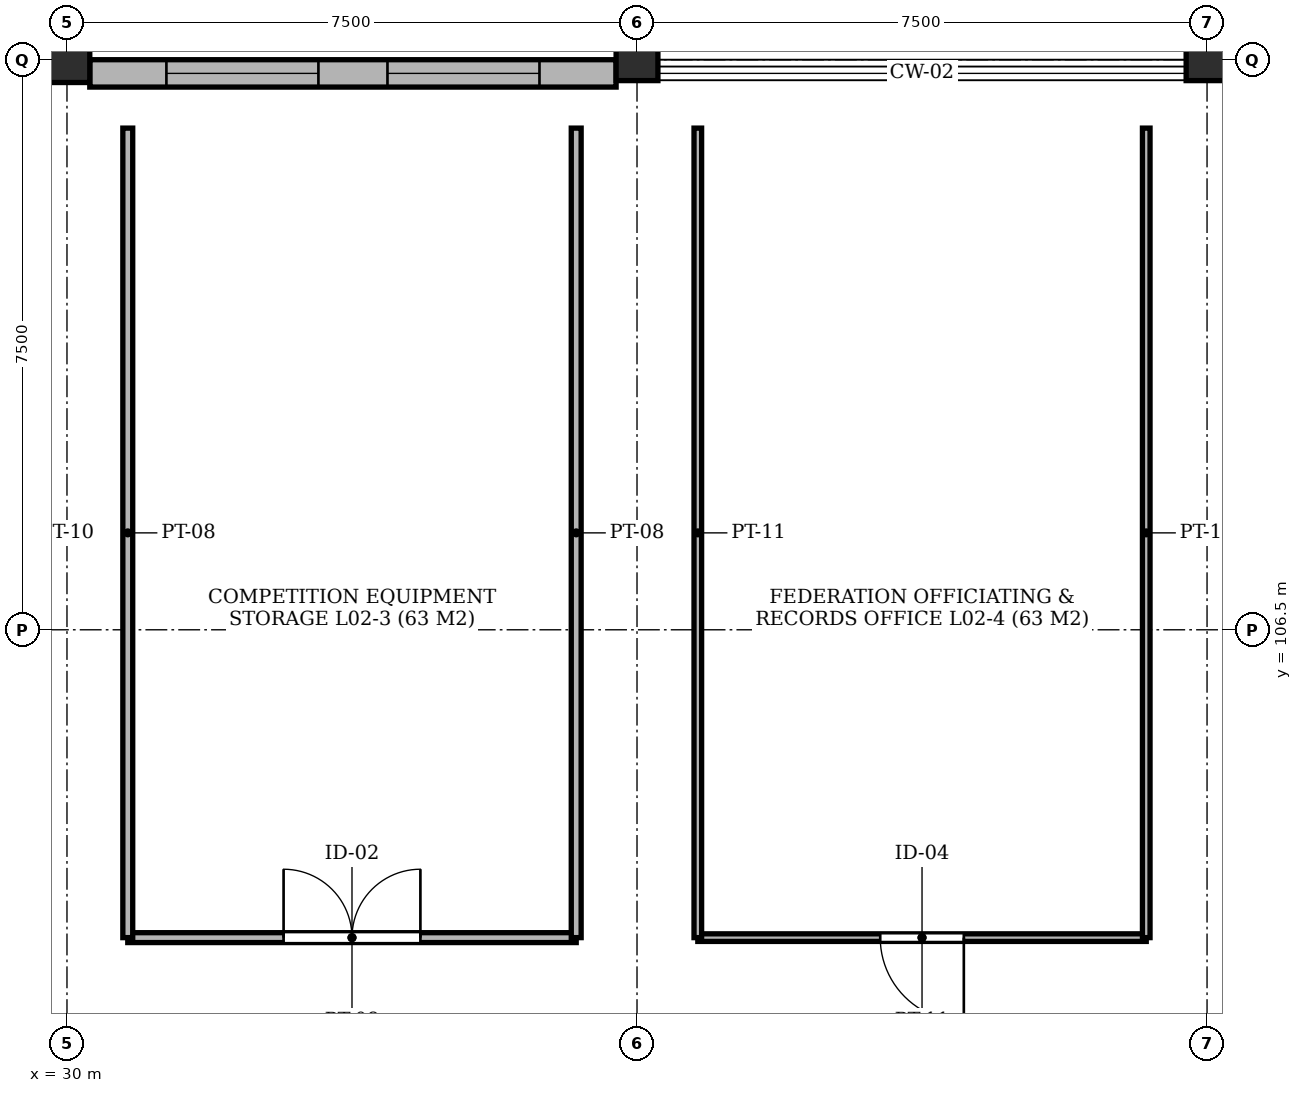
"""IFC4 building model, lengths in metres.
Left out: names, types, materials, properties, quantities, classifications, styles, units other than length and angle.
Written with IfcOpenShell. Run it as: python <this file> out.ifc"""

import sys

from ifc_helpers import new_model, si_unit, direction, frame, frame_2d, origin, origin_2d, place, context, subcontext, project, spatial, rectangle, extrude, element, fill, save


model = new_model("IFC4")
c1 = context("Model", 3, precision=1e-05, world=origin(), true_north=direction((0.0, 1.0)))
c2 = subcontext(c1, "Body", "Model", "MODEL_VIEW")
j1 = project(units=[si_unit("LENGTHUNIT", "METRE"), si_unit("PLANEANGLEUNIT", "RADIAN")], contexts=[c1])
p1 = place(None, origin())
s1 = spatial("IfcSite", under=j1, at=p1, CompositionType="ELEMENT")
p2 = place(p1, origin())
s2 = spatial("IfcBuilding", under=s1, at=p2, CompositionType="ELEMENT")
p3 = place(p2, frame((0.0, 0.0, 9.4)))
s3 = spatial("IfcBuildingStorey", under=s2, at=p3, CompositionType="ELEMENT", Elevation=9.4)
p4 = place(p3, frame((30.0, 114.0, -0.45), z_axis=(0.0, 0.0, 1.0), x_axis=(1.0, 0.0, 0.0)))
e1 = element("IfcColumn", 1, at=p4, inside=s3, PredefinedType="COLUMN", context=c2, shape_type="SweptSolid", body=[
    extrude(rectangle(XDim=0.6, YDim=0.6, at=origin_2d()), origin(), (0.0, 0.0, 1.0), 4.77),
])
for number, where, z_axis, x_axis in (
    (2, (37.5, 114.0, -0.45), (0.0, 0.0, 1.0), (1.0, 0.0, 0.0)),
    (3, (45.0, 114.0, -0.45), (0.0, 0.0, 1.0), (1.0, 0.0, 0.0)),
):
    element("IfcColumn", number, at=place(p3, frame(where, z_axis=z_axis, x_axis=x_axis)), inside=s3, PredefinedType="COLUMN", context=c2, shape_type="SweptSolid", body=[
        extrude(rectangle(XDim=0.55, YDim=0.55, at=origin_2d()), origin(), (0.0, 0.0, 1.0), 4.77),
    ])
p5 = place(p3, frame((37.225, 113.82, 0.0), z_axis=(0.0, 0.0, 1.0), x_axis=(-1.0, 0.0, 0.0)))
e4 = element("IfcWall", 4, at=p5, inside=s3, PredefinedType="SOLIDWALL", context=c2, shape_type="SweptSolid", body=[
    extrude(rectangle(XDim=6.925, YDim=0.36, at=frame_2d((3.462, 0.0))), origin(), (0.0, 0.0, 1.0), 3.82),
])
p6 = place(p5, frame((3.917, 0.0, 0.92)))
e5 = element("IfcOpeningElement", 5, at=p6, cuts=e4, PredefinedType="OPENING", context=c2, shape_type="SweptSolid", body=[
    extrude(rectangle(XDim=2.0, YDim=2.1, at=frame_2d((1.0, 1.05))), frame((0.0, 0.192, 0.0), z_axis=(0.0, -1.0, 0.0), x_axis=(1.0, 0.0, 0.0)), (0.0, 0.0, 1.0), 0.384),
])
p7 = place(p5, frame((1.008, 0.0, 0.92)))
e6 = element("IfcOpeningElement", 6, at=p7, cuts=e4, PredefinedType="OPENING", context=c2, shape_type="SweptSolid", body=[
    extrude(rectangle(XDim=2.0, YDim=2.1, at=frame_2d((1.0, 1.05))), frame((0.0, 0.192, 0.0), z_axis=(0.0, -1.0, 0.0), x_axis=(1.0, 0.0, 0.0)), (0.0, 0.0, 1.0), 0.384),
])
p8 = place(p3, frame((30.8, 102.45, 0.0), z_axis=(0.0, 0.0, 1.0), x_axis=(1.0, 0.0, 0.0)))
e7 = element("IfcWall", 7, at=p8, inside=s3, PredefinedType="PARTITIONING", context=c2, shape_type="SweptSolid", body=[
    extrude(rectangle(XDim=5.9, YDim=0.13, at=frame_2d((2.95, 0.0))), origin(), (0.0, 0.0, 1.0), 3.88),
])
p9 = place(p8, frame((2.05, 0.0, 0.0)))
e8 = element("IfcOpeningElement", 8, at=p9, cuts=e7, PredefinedType="OPENING", context=c2, shape_type="SweptSolid", body=[
    extrude(rectangle(XDim=1.8, YDim=2.25, at=frame_2d((0.9, 1.125))), frame((0.0, 0.077, 0.0), z_axis=(0.0, -1.0, 0.0), x_axis=(1.0, 0.0, 0.0)), (0.0, 0.0, 1.0), 0.154),
])
for number, where, z_axis, x_axis in (
    (9, (30.8, 102.45, 0.0), (0.0, 0.0, 1.0), (0.0, 1.0, 0.0)),
    (10, (36.7, 102.45, 0.0), (0.0, 0.0, 1.0), (0.0, 1.0, 0.0)),
):
    element("IfcWall", number, at=place(p3, frame(where, z_axis=z_axis, x_axis=x_axis)), inside=s3, PredefinedType="PARTITIONING", context=c2, shape_type="SweptSolid", body=[
        extrude(rectangle(XDim=10.65, YDim=0.13, at=frame_2d((5.325, 0.0))), origin(), (0.0, 0.0, 1.0), 3.88),
    ])
p10 = place(p3, frame((38.3, 102.45, 0.0), z_axis=(0.0, 0.0, 1.0), x_axis=(1.0, 0.0, 0.0)))
e11 = element("IfcWall", 11, at=p10, inside=s3, PredefinedType="PARTITIONING", context=c2, shape_type="SweptSolid", body=[
    extrude(rectangle(XDim=5.9, YDim=0.1, at=frame_2d((2.95, 0.0))), origin(), (0.0, 0.0, 1.0), 3.88),
])
p11 = place(p10, frame((2.4, 0.0, 0.0)))
e12 = element("IfcOpeningElement", 12, at=p11, cuts=e11, PredefinedType="OPENING", context=c2, shape_type="SweptSolid", body=[
    extrude(rectangle(XDim=1.1, YDim=2.15, at=frame_2d((0.55, 1.075))), frame((0.0, 0.062, 0.0), z_axis=(0.0, -1.0, 0.0), x_axis=(1.0, 0.0, 0.0)), (0.0, 0.0, 1.0), 0.124),
])
for number, where, z_axis, x_axis in (
    (13, (38.3, 102.45, 0.0), (0.0, 0.0, 1.0), (0.0, 1.0, 0.0)),
    (14, (44.2, 102.45, 0.0), (0.0, 0.0, 1.0), (0.0, 1.0, 0.0)),
):
    element("IfcWall", number, at=place(p3, frame(where, z_axis=z_axis, x_axis=x_axis)), inside=s3, PredefinedType="PARTITIONING", context=c2, shape_type="SweptSolid", body=[
        extrude(rectangle(XDim=10.65, YDim=0.1, at=frame_2d((5.325, 0.0))), origin(), (0.0, 0.0, 1.0), 3.88),
    ])
p12 = place(p6, origin())
e15 = element("IfcWindow", 15, at=p12, inside=s3, PartitioningType="SINGLE_PANEL", PredefinedType="WINDOW", context=c2, shape_type="SweptSolid", body=[
    extrude(rectangle(XDim=2.0, YDim=2.1, at=frame_2d((1.0, 1.05))), frame((0.0, 0.03, 0.0), z_axis=(0.0, -1.0, 0.0), x_axis=(1.0, 0.0, 0.0)), (0.0, 0.0, 1.0), 0.06),
])
fill(e5, e15)
p13 = place(p7, origin())
e16 = element("IfcWindow", 16, at=p13, inside=s3, PartitioningType="SINGLE_PANEL", PredefinedType="WINDOW", context=c2, shape_type="SweptSolid", body=[
    extrude(rectangle(XDim=2.0, YDim=2.1, at=frame_2d((1.0, 1.05))), frame((0.0, 0.03, 0.0), z_axis=(0.0, -1.0, 0.0), x_axis=(1.0, 0.0, 0.0)), (0.0, 0.0, 1.0), 0.06),
])
fill(e6, e16)
p14 = place(p9, origin())
e17 = element("IfcDoor", 17, at=p14, inside=s3, OperationType="DOUBLE_DOOR_SINGLE_SWING", PredefinedType="DOOR", context=c2, shape_type="SweptSolid", body=[
    extrude(rectangle(XDim=1.8, YDim=2.25, at=frame_2d((0.9, 1.125))), frame((0.0, 0.025, 0.0), z_axis=(0.0, -1.0, 0.0), x_axis=(1.0, 0.0, 0.0)), (0.0, 0.0, 1.0), 0.05),
])
fill(e8, e17)
p15 = place(p11, frame((1.1, 0.0, 0.0), z_axis=(0.0, 0.0, 1.0), x_axis=(-1.0, 0.0, 0.0)))
e18 = element("IfcDoor", 18, at=p15, inside=s3, OperationType="SINGLE_SWING_RIGHT", PredefinedType="DOOR", context=c2, shape_type="SweptSolid", body=[
    extrude(rectangle(XDim=1.1, YDim=2.15, at=frame_2d((0.55, 1.075))), frame((0.0, 0.025, 0.0), z_axis=(0.0, -1.0, 0.0), x_axis=(1.0, 0.0, 0.0)), (0.0, 0.0, 1.0), 0.05),
])
fill(e12, e18)
save(model, sys.argv[1])
